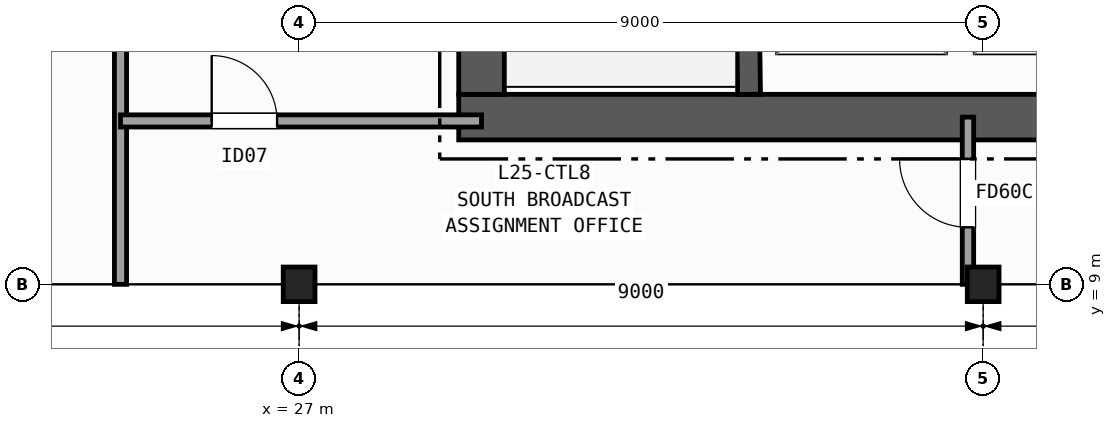
"""IFC4 building model, lengths in metres.
Left out: names, types, materials, properties, quantities, classifications, styles, units other than length and angle.
Written with IfcOpenShell. Run it as: python <this file> out.ifc"""

import sys

from ifc_helpers import new_model, si_unit, direction, frame, frame_2d, origin, origin_2d, place, context, subcontext, project, spatial, rectangle, i_section, extrude, element, fill, save


model = new_model("IFC4")
c1 = context("Model", 3, precision=1e-05, world=origin(), true_north=direction((0.0, 1.0)))
c2 = subcontext(c1, "Body", "Model", "MODEL_VIEW")
j1 = project(units=[si_unit("LENGTHUNIT", "METRE"), si_unit("PLANEANGLEUNIT", "RADIAN")], contexts=[c1])
p1 = place(None, origin())
s1 = spatial("IfcSite", under=j1, at=p1, CompositionType="ELEMENT")
p2 = place(p1, origin())
s2 = spatial("IfcBuilding", under=s1, at=p2, CompositionType="ELEMENT")
p3 = place(p2, frame((0.0, 0.0, 105.0)))
s3 = spatial("IfcBuildingStorey", under=s2, at=p3, CompositionType="ELEMENT", Elevation=105.0)
for number, where, z_axis, x_axis in (
    (1, (27.0, 9.0, 0.0), (0.0, 0.0, 1.0), (1.0, 0.0, 0.0)),
    (2, (36.0, 9.0, 0.0), (0.0, 0.0, 1.0), (1.0, 0.0, 0.0)),
):
    element("IfcColumn", number, at=place(p3, frame(where, z_axis=z_axis, x_axis=x_axis)), inside=s3, PredefinedType="COLUMN", context=c2, shape_type="SweptSolid", body=[
        extrude(i_section(OverallWidth=0.418, OverallDepth=0.455, WebThickness=0.042, FlangeThickness=0.068, FilletRadius=0.015, at=origin_2d()), origin(), (0.0, 0.0, 1.0), 5.0),
    ])
p4 = place(p3, frame((29.1, 11.2, 0.0), z_axis=(0.0, 0.0, 1.0), x_axis=(1.0, 0.0, 0.0)))
e3 = element("IfcWall", 3, at=p4, inside=s3, PredefinedType="SHEAR", context=c2, shape_type="SweptSolid", body=[
    extrude(rectangle(XDim=14.0, YDim=0.6, at=frame_2d((7.0, 0.0))), origin(), (0.0, 0.0, 1.0), 4.72),
])
p5 = place(p3, frame((29.4, 24.3, 0.0), z_axis=(0.0, 0.0, 1.0), x_axis=(0.0, -1.0, 0.0)))
e4 = element("IfcWall", 4, at=p5, inside=s3, PredefinedType="SHEAR", context=c2, shape_type="SweptSolid", body=[
    extrude(rectangle(XDim=12.8, YDim=0.6, at=frame_2d((6.4, 0.0))), origin(), (0.0, 0.0, 1.0), 4.72),
])
p6 = place(p5, frame((1.4, 0.0, 0.0)))
e5 = element("IfcOpeningElement", 5, at=p6, cuts=e4, PredefinedType="OPENING", context=c2, shape_type="SweptSolid", body=[
    extrude(rectangle(XDim=1.35, YDim=2.15, at=frame_2d((0.675, 1.075))), frame((0.0, 0.31, 0.0), z_axis=(0.0, -1.0, 0.0), x_axis=(1.0, 0.0, 0.0)), (0.0, 0.0, 1.0), 0.62),
])
p7 = place(p3, frame((32.92, 11.5, 0.0), z_axis=(0.0, 0.0, 1.0), x_axis=(-0.013244407292, 0.999912288991, 0.0)))
e6 = element("IfcWall", 6, at=p7, inside=s3, PredefinedType="SHEAR", context=c2, shape_type="SweptSolid", body=[
    extrude(rectangle(XDim=9.051, YDim=0.3, at=frame_2d((4.525, 0.0))), origin(), (0.0, 0.0, 1.0), 4.72),
])
p8 = place(p3, frame((24.65, 9.0, 0.0), z_axis=(0.0, 0.0, 1.0), x_axis=(0.0, 1.0, 0.0)))
e7 = element("IfcWall", 7, at=p8, inside=s3, PredefinedType="PARTITIONING", context=c2, shape_type="SweptSolid", body=[
    extrude(rectangle(XDim=19.2, YDim=0.16, at=frame_2d((9.6, 0.0))), origin(), (0.0, 0.0, 1.0), 3.934),
])
p9 = place(p8, frame((12.2, 0.0, 0.0)))
e8 = element("IfcOpeningElement", 8, at=p9, cuts=e7, PredefinedType="OPENING", context=c2, shape_type="SweptSolid", body=[
    extrude(rectangle(XDim=0.95, YDim=2.1, at=frame_2d((0.475, 1.05))), frame((0.0, 0.09, 0.0), z_axis=(0.0, -1.0, 0.0), x_axis=(1.0, 0.0, 0.0)), (0.0, 0.0, 1.0), 0.18),
])
p10 = place(p8, frame((4.2, 0.0, 0.0)))
e9 = element("IfcOpeningElement", 9, at=p10, cuts=e7, PredefinedType="OPENING", context=c2, shape_type="SweptSolid", body=[
    extrude(rectangle(XDim=1.0, YDim=2.1, at=frame_2d((0.5, 1.05))), frame((0.0, 0.09, 0.0), z_axis=(0.0, -1.0, 0.0), x_axis=(1.0, 0.0, 0.0)), (0.0, 0.0, 1.0), 0.18),
])
p11 = place(p3, frame((24.65, 11.15, 0.0), z_axis=(0.0, 0.0, 1.0), x_axis=(1.0, 0.0, 0.0)))
e10 = element("IfcWall", 10, at=p11, inside=s3, PredefinedType="PARTITIONING", context=c2, shape_type="SweptSolid", body=[
    extrude(rectangle(XDim=4.75, YDim=0.16, at=frame_2d((2.375, 0.0))), origin(), (0.0, 0.0, 1.0), 4.092),
])
p12 = place(p11, frame((1.2, 0.0, 0.0)))
e11 = element("IfcOpeningElement", 11, at=p12, cuts=e10, PredefinedType="OPENING", context=c2, shape_type="SweptSolid", body=[
    extrude(rectangle(XDim=0.86, YDim=2.05, at=frame_2d((0.43, 1.025))), frame((0.0, 0.09, 0.0), z_axis=(0.0, -1.0, 0.0), x_axis=(1.0, 0.0, 0.0)), (0.0, 0.0, 1.0), 0.18),
])
p13 = place(p3, frame((35.8, 9.0, 0.0), z_axis=(0.0, 0.0, 1.0), x_axis=(0.0, 1.0, 0.0)))
e12 = element("IfcWall", 12, at=p13, inside=s3, PredefinedType="PARTITIONING", context=c2, shape_type="SweptSolid", body=[
    extrude(rectangle(XDim=2.2, YDim=0.15, at=frame_2d((1.1, 0.0))), origin(), (0.0, 0.0, 1.0), 3.934),
])
p14 = place(p13, frame((0.75, 0.0, 0.0)))
e13 = element("IfcOpeningElement", 13, at=p14, cuts=e12, PredefinedType="OPENING", context=c2, shape_type="SweptSolid", body=[
    extrude(rectangle(XDim=0.9, YDim=2.1, at=frame_2d((0.45, 1.05))), frame((0.0, 0.085, 0.0), z_axis=(0.0, -1.0, 0.0), x_axis=(1.0, 0.0, 0.0)), (0.0, 0.0, 1.0), 0.17),
])
p15 = place(p12, origin())
e14 = element("IfcDoor", 14, at=p15, inside=s3, OperationType="SINGLE_SWING_LEFT", PredefinedType="DOOR", context=c2, shape_type="SweptSolid", body=[
    extrude(rectangle(XDim=0.86, YDim=2.05, at=frame_2d((0.43, 1.025))), frame((0.0, 0.025, 0.0), z_axis=(0.0, -1.0, 0.0), x_axis=(1.0, 0.0, 0.0)), (0.0, 0.0, 1.0), 0.05),
])
fill(e11, e14)
p16 = place(p14, origin())
e15 = element("IfcDoor", 15, at=p16, inside=s3, OperationType="SINGLE_SWING_RIGHT", PredefinedType="DOOR", context=c2, shape_type="SweptSolid", body=[
    extrude(rectangle(XDim=0.9, YDim=2.1, at=frame_2d((0.45, 1.05))), frame((0.0, 0.025, 0.0), z_axis=(0.0, -1.0, 0.0), x_axis=(1.0, 0.0, 0.0)), (0.0, 0.0, 1.0), 0.05),
])
fill(e13, e15)
save(model, sys.argv[1])
